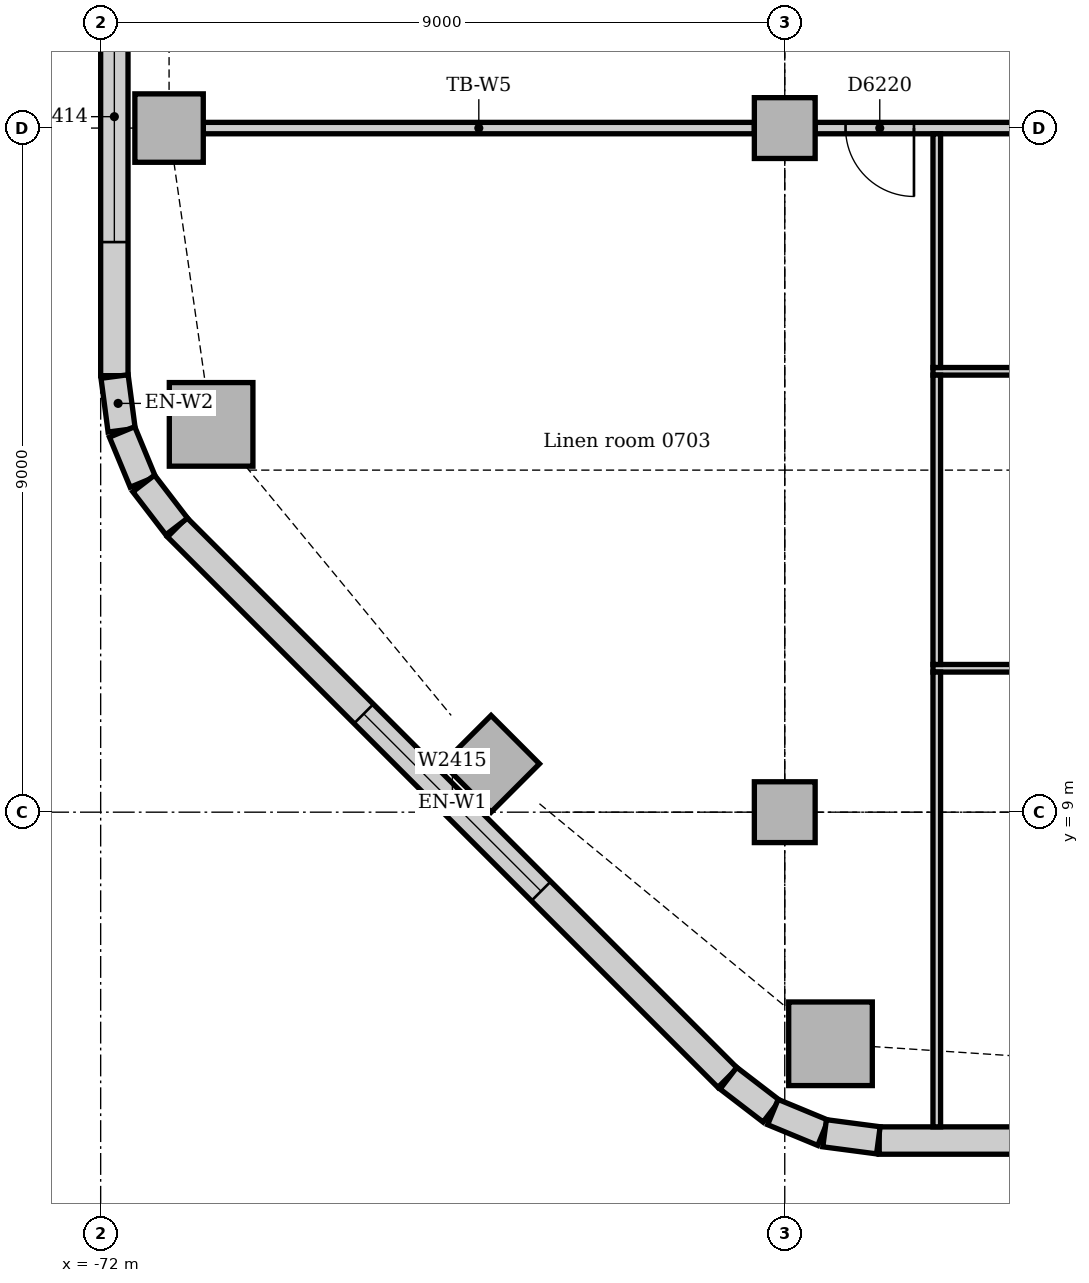
"""IFC4 building model, lengths in metres.
Left out: names, types, materials, properties, quantities, classifications, styles, units other than length and angle.
Written with IfcOpenShell. Run it as: python <this file> out.ifc"""

import sys

from ifc_helpers import new_model, si_unit, direction, frame, frame_2d, origin, origin_2d, place, context, subcontext, project, spatial, rectangle, extrude, element, fill, save


model = new_model("IFC4")
c1 = context("Model", 3, precision=1e-05, world=origin(), true_north=direction((0.0, 1.0)))
c2 = subcontext(c1, "Body", "Model", "MODEL_VIEW")
j1 = project(units=[si_unit("LENGTHUNIT", "METRE"), si_unit("PLANEANGLEUNIT", "RADIAN")], contexts=[c1])
p1 = place(None, origin())
s1 = spatial("IfcSite", under=j1, at=p1, CompositionType="ELEMENT")
p2 = place(p1, origin())
s2 = spatial("IfcBuilding", under=s1, at=p2, CompositionType="ELEMENT")
p3 = place(p2, frame((0.0, 0.0, 34.0)))
s3 = spatial("IfcBuildingStorey", under=s2, at=p3, CompositionType="ELEMENT", Elevation=34.0)
for number, where, z_axis, x_axis in (
    (1, (-62.398, 5.953, 0.0), (0.0, 0.0, 1.0), (1.0, 0.0, 0.0)),
    (2, (-70.547, 14.102, 0.0), (0.0, 0.0, 1.0), (1.0, 0.0, 0.0)),
):
    element("IfcColumn", number, at=place(p3, frame(where, z_axis=z_axis, x_axis=x_axis)), inside=s3, PredefinedType="COLUMN", context=c2, shape_type="SweptSolid", body=[
        extrude(rectangle(XDim=1.1, YDim=1.1, at=origin_2d()), origin(), (0.0, 0.0, 1.0), 3.85),
    ])
for number, where, z_axis, x_axis in (
    (3, (-71.1, 18.0, 0.0), (0.0, 0.0, 1.0), (1.0, 0.0, 0.0)),
    (4, (-66.864, 9.636, 0.0), (0.0, 0.0, 1.0), (0.707, 0.707, 0.0)),
):
    element("IfcColumn", number, at=place(p3, frame(where, z_axis=z_axis, x_axis=x_axis)), inside=s3, PredefinedType="COLUMN", context=c2, shape_type="SweptSolid", body=[
        extrude(rectangle(XDim=0.9, YDim=0.9, at=origin_2d()), origin(), (0.0, 0.0, 1.0), 3.85),
    ])
for number, where, z_axis, x_axis in (
    (5, (-63.0, 9.0, 0.0), (0.0, 0.0, 1.0), (1.0, 0.0, 0.0)),
    (6, (-63.0, 18.0, 0.0), (0.0, 0.0, 1.0), (1.0, 0.0, 0.0)),
):
    element("IfcColumn", number, at=place(p3, frame(where, z_axis=z_axis, x_axis=x_axis)), inside=s3, PredefinedType="COLUMN", context=c2, shape_type="SweptSolid", body=[
        extrude(rectangle(XDim=0.8, YDim=0.8, at=origin_2d()), origin(), (0.0, 0.0, 1.0), 3.85),
    ])
p4 = place(p3, frame((-61.757, 4.68, 0.0), z_axis=(0.0, 0.0, 1.0), x_axis=(1.0, 0.0, 0.0)))
e7 = element("IfcWall", 7, at=p4, inside=s3, PredefinedType="STANDARD", context=c2, shape_type="SweptSolid", body=[
    extrude(rectangle(XDim=30.515, YDim=0.36, at=frame_2d((15.257, 0.0))), origin(), (0.0, 0.0, 1.0), 3.85),
])
p5 = place(p4, frame((2.357, 0.0, 0.9)))
e8 = element("IfcOpeningElement", 8, at=p5, cuts=e7, PredefinedType="OPENING", context=c2, shape_type="SweptSolid", body=[
    extrude(rectangle(XDim=3.3, YDim=1.6, at=frame_2d((1.65, 0.8))), frame((0.0, 0.19, 0.0), z_axis=(0.0, -1.0, 0.0), x_axis=(1.0, 0.0, 0.0)), (0.0, 0.0, 1.0), 0.38),
])
p6 = place(p4, frame((6.857, 0.0, 0.9)))
e9 = element("IfcOpeningElement", 9, at=p6, cuts=e7, PredefinedType="OPENING", context=c2, shape_type="SweptSolid", body=[
    extrude(rectangle(XDim=3.3, YDim=1.6, at=frame_2d((1.65, 0.8))), frame((0.0, 0.19, 0.0), z_axis=(0.0, -1.0, 0.0), x_axis=(1.0, 0.0, 0.0)), (0.0, 0.0, 1.0), 0.38),
])
p7 = place(p4, frame((11.357, 0.0, 0.9)))
e10 = element("IfcOpeningElement", 10, at=p7, cuts=e7, PredefinedType="OPENING", context=c2, shape_type="SweptSolid", body=[
    extrude(rectangle(XDim=3.3, YDim=1.6, at=frame_2d((1.65, 0.8))), frame((0.0, 0.19, 0.0), z_axis=(0.0, -1.0, 0.0), x_axis=(1.0, 0.0, 0.0)), (0.0, 0.0, 1.0), 0.38),
])
p8 = place(p4, frame((15.857, 0.0, 0.9)))
e11 = element("IfcOpeningElement", 11, at=p8, cuts=e7, PredefinedType="OPENING", context=c2, shape_type="SweptSolid", body=[
    extrude(rectangle(XDim=3.3, YDim=1.6, at=frame_2d((1.65, 0.8))), frame((0.0, 0.19, 0.0), z_axis=(0.0, -1.0, 0.0), x_axis=(1.0, 0.0, 0.0)), (0.0, 0.0, 1.0), 0.38),
])
p9 = place(p4, frame((20.357, 0.0, 0.9)))
e12 = element("IfcOpeningElement", 12, at=p9, cuts=e7, PredefinedType="OPENING", context=c2, shape_type="SweptSolid", body=[
    extrude(rectangle(XDim=3.3, YDim=1.6, at=frame_2d((1.65, 0.8))), frame((0.0, 0.19, 0.0), z_axis=(0.0, -1.0, 0.0), x_axis=(1.0, 0.0, 0.0)), (0.0, 0.0, 1.0), 0.38),
])
p10 = place(p4, frame((24.857, 0.0, 0.9)))
e13 = element("IfcOpeningElement", 13, at=p10, cuts=e7, PredefinedType="OPENING", context=c2, shape_type="SweptSolid", body=[
    extrude(rectangle(XDim=3.3, YDim=1.6, at=frame_2d((1.65, 0.8))), frame((0.0, 0.19, 0.0), z_axis=(0.0, -1.0, 0.0), x_axis=(1.0, 0.0, 0.0)), (0.0, 0.0, 1.0), 0.38),
])
p11 = place(p3, frame((-71.82, 40.757, 0.0), z_axis=(0.0, 0.0, 1.0), x_axis=(0.0, -1.0, 0.0)))
e14 = element("IfcWall", 14, at=p11, inside=s3, PredefinedType="STANDARD", context=c2, shape_type="SweptSolid", body=[
    extrude(rectangle(XDim=26.015, YDim=0.36, at=frame_2d((13.007, 0.0))), origin(), (0.0, 0.0, 1.0), 3.85),
])
p12 = place(p11, frame((2.357, 0.0, 0.9)))
e15 = element("IfcOpeningElement", 15, at=p12, cuts=e14, PredefinedType="OPENING", context=c2, shape_type="SweptSolid", body=[
    extrude(rectangle(XDim=3.3, YDim=1.6, at=frame_2d((1.65, 0.8))), frame((0.0, 0.19, 0.0), z_axis=(0.0, -1.0, 0.0), x_axis=(1.0, 0.0, 0.0)), (0.0, 0.0, 1.0), 0.38),
])
p13 = place(p11, frame((7.057, 0.0, 0.9)))
e16 = element("IfcOpeningElement", 16, at=p13, cuts=e14, PredefinedType="OPENING", context=c2, shape_type="SweptSolid", body=[
    extrude(rectangle(XDim=3.3, YDim=1.6, at=frame_2d((1.65, 0.8))), frame((0.0, 0.19, 0.0), z_axis=(0.0, -1.0, 0.0), x_axis=(1.0, 0.0, 0.0)), (0.0, 0.0, 1.0), 0.38),
])
p14 = place(p11, frame((11.357, 0.0, 0.9)))
e17 = element("IfcOpeningElement", 17, at=p14, cuts=e14, PredefinedType="OPENING", context=c2, shape_type="SweptSolid", body=[
    extrude(rectangle(XDim=3.3, YDim=1.6, at=frame_2d((1.65, 0.8))), frame((0.0, 0.19, 0.0), z_axis=(0.0, -1.0, 0.0), x_axis=(1.0, 0.0, 0.0)), (0.0, 0.0, 1.0), 0.38),
])
p15 = place(p11, frame((15.857, 0.0, 0.9)))
e18 = element("IfcOpeningElement", 18, at=p15, cuts=e14, PredefinedType="OPENING", context=c2, shape_type="SweptSolid", body=[
    extrude(rectangle(XDim=3.3, YDim=1.6, at=frame_2d((1.65, 0.8))), frame((0.0, 0.19, 0.0), z_axis=(0.0, -1.0, 0.0), x_axis=(1.0, 0.0, 0.0)), (0.0, 0.0, 1.0), 0.38),
])
p16 = place(p11, frame((20.957, 0.0, 0.9)))
e19 = element("IfcOpeningElement", 19, at=p16, cuts=e14, PredefinedType="OPENING", context=c2, shape_type="SweptSolid", body=[
    extrude(rectangle(XDim=3.3, YDim=1.6, at=frame_2d((1.65, 0.8))), frame((0.0, 0.19, 0.0), z_axis=(0.0, -1.0, 0.0), x_axis=(1.0, 0.0, 0.0)), (0.0, 0.0, 1.0), 0.38),
])
p17 = place(p3, frame((-70.994, 12.749, 0.0), z_axis=(0.0, 0.0, 1.0), x_axis=(0.707106781187, -0.707106781187, 0.0)))
e20 = element("IfcWall", 20, at=p17, inside=s3, PredefinedType="STANDARD", context=c2, shape_type="SweptSolid", body=[
    extrude(rectangle(XDim=10.243, YDim=0.36, at=frame_2d((5.121, 0.0))), origin(), (0.0, 0.0, 1.0), 3.85),
])
p18 = place(p17, frame((3.471, 0.0, 0.9)))
e21 = element("IfcOpeningElement", 21, at=p18, cuts=e20, PredefinedType="OPENING", context=c2, shape_type="SweptSolid", body=[
    extrude(rectangle(XDim=3.3, YDim=1.6, at=frame_2d((1.65, 0.8))), frame((0.0, 0.19, 0.0), z_axis=(0.0, -1.0, 0.0), x_axis=(1.0, 0.0, 0.0)), (0.0, 0.0, 1.0), 0.38),
])
for number, where, z_axis, x_axis in (
    (22, (-71.817, 14.731, 0.0), (0.0, 0.0, 1.0), (0.131, -0.991, 0.0)),
    (23, (-71.718, 14.003, 0.0), (0.0, 0.0, 1.0), (0.383, -0.924, 0.0)),
):
    element("IfcWall", number, at=place(p3, frame(where, z_axis=z_axis, x_axis=x_axis)), inside=s3, PredefinedType="STANDARD", context=c2, shape_type="SweptSolid", body=[
        extrude(rectangle(XDim=0.713, YDim=0.36, at=frame_2d((0.356, 0.0))), origin(), (0.0, 0.0, 1.0), 3.85),
    ])
for number, where, z_axis, x_axis in (
    (24, (-71.434, 13.325, 0.0), (0.0, 0.0, 1.0), (0.609, -0.793, 0.0)),
    (25, (-63.741, 5.5, 0.0), (0.0, 0.0, 1.0), (0.793, -0.609, 0.0)),
):
    element("IfcWall", number, at=place(p3, frame(where, z_axis=z_axis, x_axis=x_axis)), inside=s3, PredefinedType="STANDARD", context=c2, shape_type="SweptSolid", body=[
        extrude(rectangle(XDim=0.713, YDim=0.36, at=frame_2d((0.357, 0.0))), origin(), (0.0, 0.0, 1.0), 3.85),
    ])
for number, where, z_axis, x_axis in (
    (26, (-63.156, 5.055, 0.0), (0.0, 0.0, 1.0), (0.924, -0.383, 0.0)),
    (27, (-62.476, 4.776, 0.0), (0.0, 0.0, 1.0), (0.991, -0.131, 0.0)),
):
    element("IfcWall", number, at=place(p3, frame(where, z_axis=z_axis, x_axis=x_axis)), inside=s3, PredefinedType="STANDARD", context=c2, shape_type="SweptSolid", body=[
        extrude(rectangle(XDim=0.713, YDim=0.36, at=frame_2d((0.356, 0.0))), origin(), (0.0, 0.0, 1.0), 3.85),
    ])
p19 = place(p3, frame((-62.6, 18.0, 0.0), z_axis=(0.0, 0.0, 1.0), x_axis=(1.0, 0.0, 0.0)))
e28 = element("IfcWall", 28, at=p19, inside=s3, PredefinedType="PARTITIONING", context=c2, shape_type="SweptSolid", body=[
    extrude(rectangle(XDim=8.2, YDim=0.15, at=frame_2d((4.1, 0.0))), origin(), (0.0, 0.0, 1.0), 3.15),
])
p20 = place(p19, frame((0.4, 0.0, 0.0)))
e29 = element("IfcOpeningElement", 29, at=p20, cuts=e28, PredefinedType="OPENING", context=c2, shape_type="SweptSolid", body=[
    extrude(rectangle(XDim=0.9, YDim=2.1, at=frame_2d((0.45, 1.05))), frame((0.0, 0.085, 0.0), z_axis=(0.0, -1.0, 0.0), x_axis=(1.0, 0.0, 0.0)), (0.0, 0.0, 1.0), 0.17),
])
p21 = place(p19, frame((6.81, 0.0, 0.0)))
e30 = element("IfcOpeningElement", 30, at=p21, cuts=e28, PredefinedType="OPENING", context=c2, shape_type="SweptSolid", body=[
    extrude(rectangle(XDim=1.0, YDim=2.1, at=frame_2d((0.5, 1.05))), frame((0.0, 0.085, 0.0), z_axis=(0.0, -1.0, 0.0), x_axis=(1.0, 0.0, 0.0)), (0.0, 0.0, 1.0), 0.17),
])
p22 = place(p3, frame((-70.65, 18.0, 0.0), z_axis=(0.0, 0.0, 1.0), x_axis=(1.0, 0.0, 0.0)))
e31 = element("IfcWall", 31, at=p22, inside=s3, PredefinedType="PARTITIONING", context=c2, shape_type="SweptSolid", body=[
    extrude(rectangle(XDim=7.25, YDim=0.15, at=frame_2d((3.625, 0.0))), origin(), (0.0, 0.0, 1.0), 3.15),
])
p23 = place(p3, frame((-61.05, 14.8, 0.0), z_axis=(0.0, 0.0, 1.0), x_axis=(1.0, 0.0, 0.0)))
e32 = element("IfcWall", 32, at=p23, inside=s3, PredefinedType="PARTITIONING", context=c2, shape_type="SweptSolid", body=[
    extrude(rectangle(XDim=15.975, YDim=0.1, at=frame_2d((7.987, 0.0))), origin(), (0.0, 0.0, 1.0), 3.85),
])
p24 = place(p23, frame((6.31, 0.0, 0.0)))
e33 = element("IfcOpeningElement", 33, at=p24, cuts=e32, PredefinedType="OPENING", context=c2, shape_type="SweptSolid", body=[
    extrude(rectangle(XDim=0.9, YDim=2.1, at=frame_2d((0.45, 1.05))), frame((0.0, 0.06, 0.0), z_axis=(0.0, -1.0, 0.0), x_axis=(1.0, 0.0, 0.0)), (0.0, 0.0, 1.0), 0.12),
])
p25 = place(p3, frame((-61.05, 10.893, 0.0), z_axis=(0.0, 0.0, 1.0), x_axis=(1.0, 0.0, 0.0)))
e34 = element("IfcWall", 34, at=p25, inside=s3, PredefinedType="PARTITIONING", context=c2, shape_type="SweptSolid", body=[
    extrude(rectangle(XDim=15.975, YDim=0.1, at=frame_2d((7.987, 0.0))), origin(), (0.0, 0.0, 1.0), 3.85),
])
p26 = place(p25, frame((4.65, 0.0, 0.0)))
e35 = element("IfcOpeningElement", 35, at=p26, cuts=e34, PredefinedType="OPENING", context=c2, shape_type="SweptSolid", body=[
    extrude(rectangle(XDim=0.9, YDim=2.1, at=frame_2d((0.45, 1.05))), frame((0.0, 0.06, 0.0), z_axis=(0.0, -1.0, 0.0), x_axis=(1.0, 0.0, 0.0)), (0.0, 0.0, 1.0), 0.12),
])
p27 = place(p25, frame((12.5, 0.0, 0.0)))
e36 = element("IfcOpeningElement", 36, at=p27, cuts=e34, PredefinedType="OPENING", context=c2, shape_type="SweptSolid", body=[
    extrude(rectangle(XDim=0.9, YDim=2.1, at=frame_2d((0.45, 1.05))), frame((0.0, 0.06, 0.0), z_axis=(0.0, -1.0, 0.0), x_axis=(1.0, 0.0, 0.0)), (0.0, 0.0, 1.0), 0.12),
])
p28 = place(p3, frame((-61.0, 14.85, 0.0), z_axis=(0.0, 0.0, 1.0), x_axis=(0.0, 1.0, 0.0)))
e37 = element("IfcWall", 37, at=p28, inside=s3, PredefinedType="PARTITIONING", context=c2, shape_type="SweptSolid", body=[
    extrude(rectangle(XDim=3.075, YDim=0.1, at=frame_2d((1.538, 0.0))), origin(), (0.0, 0.0, 1.0), 3.85),
])
p29 = place(p3, frame((-61.0, 10.943, 0.0), z_axis=(0.0, 0.0, 1.0), x_axis=(0.0, 1.0, 0.0)))
e38 = element("IfcWall", 38, at=p29, inside=s3, PredefinedType="PARTITIONING", context=c2, shape_type="SweptSolid", body=[
    extrude(rectangle(XDim=3.807, YDim=0.1, at=frame_2d((1.903, 0.0))), origin(), (0.0, 0.0, 1.0), 3.85),
])
p30 = place(p3, frame((-61.0, 4.86, 0.0), z_axis=(0.0, 0.0, 1.0), x_axis=(0.0, 1.0, 0.0)))
e39 = element("IfcWall", 39, at=p30, inside=s3, PredefinedType="PARTITIONING", context=c2, shape_type="SweptSolid", body=[
    extrude(rectangle(XDim=5.983, YDim=0.1, at=frame_2d((2.992, 0.0))), origin(), (0.0, 0.0, 1.0), 3.85),
])
p31 = place(p16, origin())
e40 = element("IfcWindow", 40, at=p31, inside=s3, PartitioningType="SINGLE_PANEL", PredefinedType="WINDOW", context=c2, shape_type="SweptSolid", body=[
    extrude(rectangle(XDim=3.3, YDim=1.6, at=frame_2d((1.65, 0.8))), frame((0.0, 0.13, 0.0), z_axis=(0.0, -1.0, 0.0), x_axis=(1.0, 0.0, 0.0)), (0.0, 0.0, 1.0), 0.06),
])
fill(e19, e40)
p32 = place(p18, origin())
e41 = element("IfcWindow", 41, at=p32, inside=s3, PartitioningType="SINGLE_PANEL", PredefinedType="WINDOW", context=c2, shape_type="SweptSolid", body=[
    extrude(rectangle(XDim=3.3, YDim=1.6, at=frame_2d((1.65, 0.8))), frame((0.0, 0.13, 0.0), z_axis=(0.0, -1.0, 0.0), x_axis=(1.0, 0.0, 0.0)), (0.0, 0.0, 1.0), 0.06),
])
fill(e21, e41)
p33 = place(p20, frame((0.9, 0.0, 0.0), z_axis=(0.0, 0.0, 1.0), x_axis=(-1.0, 0.0, 0.0)))
e42 = element("IfcDoor", 42, at=p33, inside=s3, OperationType="SINGLE_SWING_LEFT", PredefinedType="DOOR", context=c2, shape_type="SweptSolid", body=[
    extrude(rectangle(XDim=0.9, YDim=2.1, at=frame_2d((0.45, 1.05))), frame((0.0, 0.025, 0.0), z_axis=(0.0, -1.0, 0.0), x_axis=(1.0, 0.0, 0.0)), (0.0, 0.0, 1.0), 0.05),
])
fill(e29, e42)
save(model, sys.argv[1])
